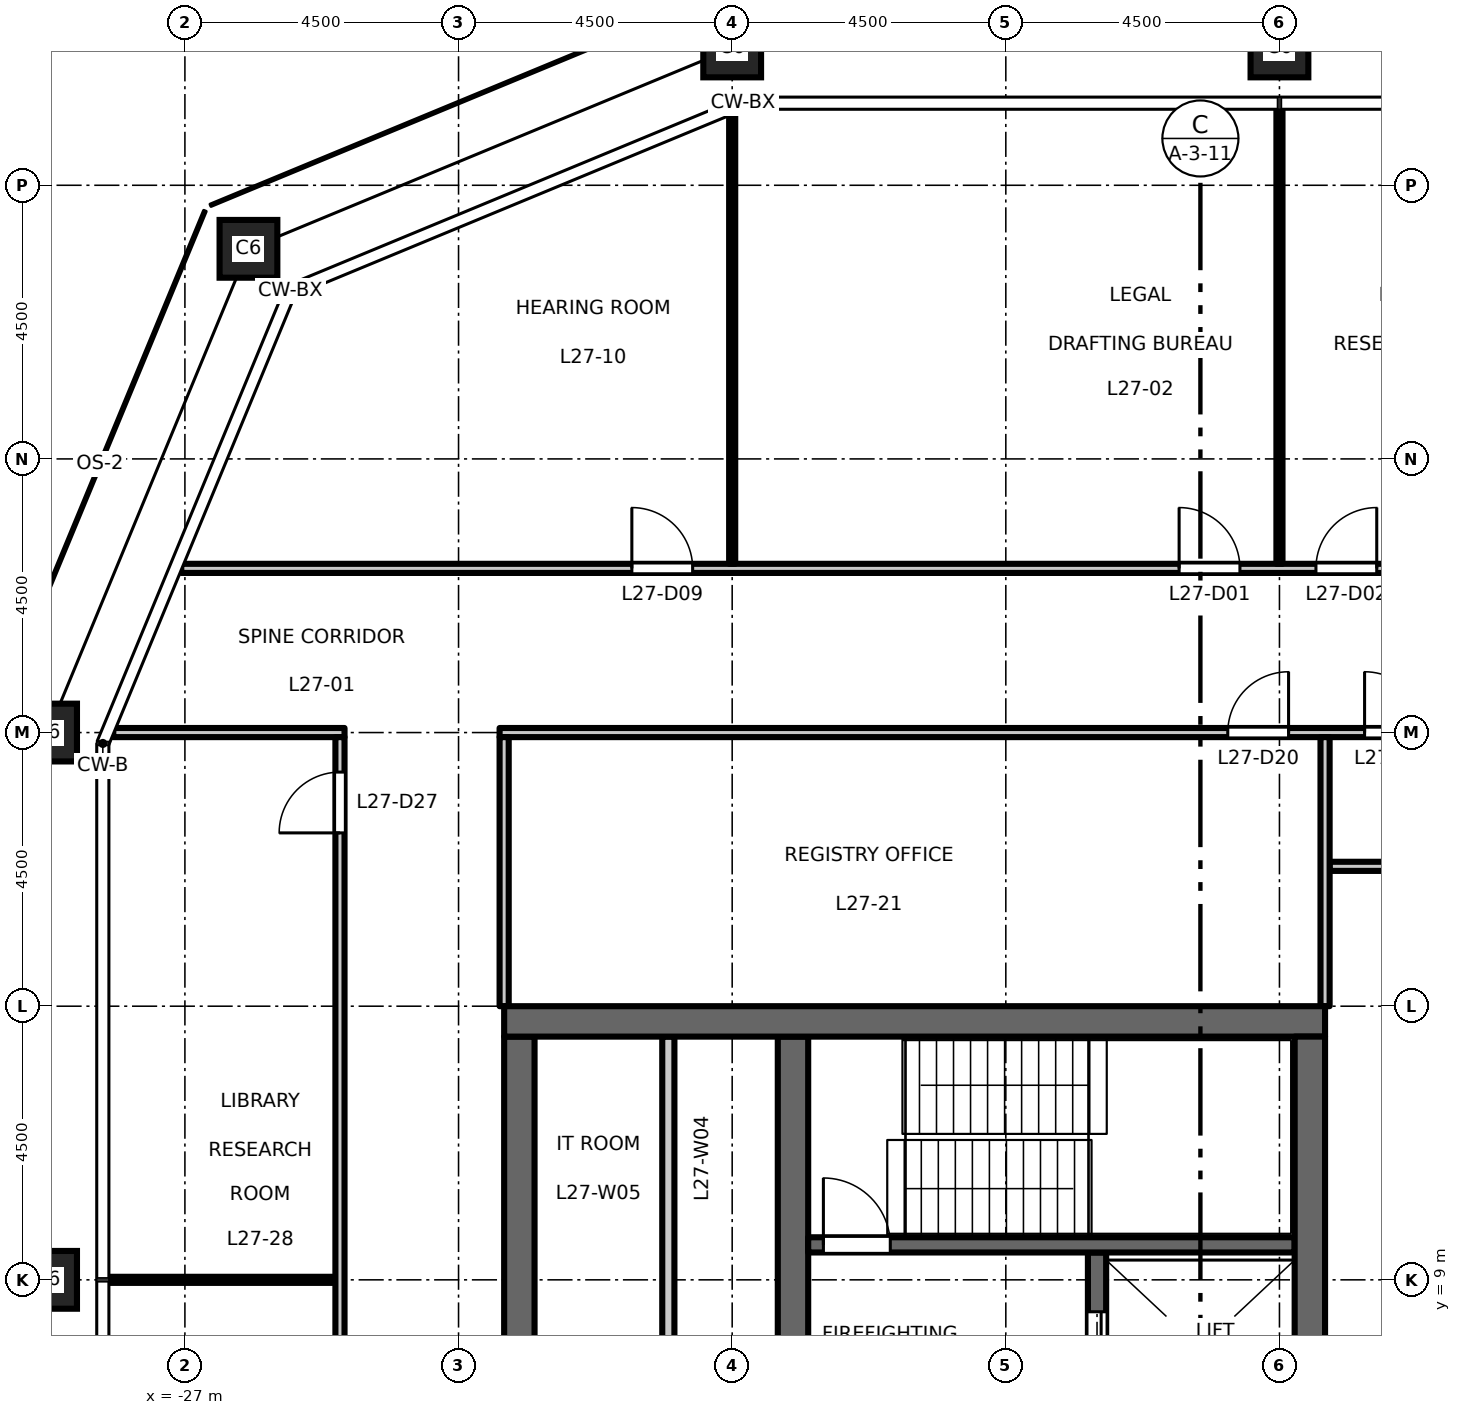
"""IFC4 building model, lengths in metres.
Left out: names, types, materials, properties, quantities, classifications, styles, units other than length and angle.
Written with IfcOpenShell. Run it as: python <this file> out.ifc"""

import sys

from ifc_helpers import new_model, si_unit, direction, frame, frame_2d, origin, origin_2d, place, context, subcontext, project, spatial, rectangle, hollow_rectangle, extrude, element, fill, save


model = new_model("IFC4")
c1 = context("Model", 3, precision=1e-05, world=origin(), true_north=direction((0.0, 1.0)))
c2 = subcontext(c1, "Body", "Model", "MODEL_VIEW")
j1 = project(units=[si_unit("LENGTHUNIT", "METRE"), si_unit("PLANEANGLEUNIT", "RADIAN")], contexts=[c1])
p1 = place(None, origin())
s1 = spatial("IfcSite", under=j1, at=p1, CompositionType="ELEMENT")
p2 = place(p1, origin())
s2 = spatial("IfcBuilding", under=s1, at=p2, CompositionType="ELEMENT")
p3 = place(p2, frame((0.0, 0.0, 127.2)))
s3 = spatial("IfcBuildingStorey", under=s2, at=p3, CompositionType="ELEMENT", Elevation=127.2)
for number, where, z_axis, x_axis in (
    (1, (-9.0, 29.25, 0.0), (0.0, 0.0, 1.0), (1.0, 0.0, 0.0)),
    (2, (-18.0, 29.25, 0.0), (0.0, 0.0, 1.0), (1.0, 0.0, 0.0)),
    (3, (-25.955, 25.955, 0.0), (0.0, 0.0, 1.0), (1.0, 0.0, 0.0)),
    (4, (-29.25, 18.0, 0.0), (0.0, 0.0, 1.0), (1.0, 0.0, 0.0)),
    (5, (-29.25, 9.0, 0.0), (0.0, 0.0, 1.0), (1.0, 0.0, 0.0)),
):
    element("IfcColumn", number, at=place(p3, frame(where, z_axis=z_axis, x_axis=x_axis)), inside=s3, PredefinedType="COLUMN", context=c2, shape_type="SweptSolid", body=[
        extrude(hollow_rectangle(XDim=0.95, YDim=0.95, WallThickness=0.055, at=origin_2d()), origin(), (0.0, 0.0, 1.0), 4.5),
    ])
p4 = place(p3, frame((-12.0, -9.45, 0.0), z_axis=(0.0, 0.0, 1.0), x_axis=(0.0, 1.0, 0.0)))
e6 = element("IfcWall", 6, at=p4, inside=s3, PredefinedType="SHEAR", context=c2, shape_type="SweptSolid", body=[
    extrude(rectangle(XDim=18.9, YDim=0.3, at=frame_2d((9.45, 0.0))), origin(), (0.0, 0.0, 1.0), 4.35),
])
p5 = place(p4, frame((3.625, 0.0, 0.0)))
e7 = element("IfcOpeningElement", 7, at=p5, cuts=e6, PredefinedType="OPENING", context=c2, shape_type="SweptSolid", body=[
    extrude(rectangle(XDim=1.1, YDim=2.1, at=frame_2d((0.55, 1.05))), frame((0.0, 0.16, 0.0), z_axis=(0.0, -1.0, 0.0), x_axis=(1.0, 0.0, 0.0)), (0.0, 0.0, 1.0), 0.32),
])
p6 = place(p4, frame((6.775, 0.0, 0.0)))
e8 = element("IfcOpeningElement", 8, at=p6, cuts=e6, PredefinedType="OPENING", context=c2, shape_type="SweptSolid", body=[
    extrude(rectangle(XDim=1.1, YDim=2.1, at=frame_2d((0.55, 1.05))), frame((0.0, 0.16, 0.0), z_axis=(0.0, -1.0, 0.0), x_axis=(1.0, 0.0, 0.0)), (0.0, 0.0, 1.0), 0.32),
])
p7 = place(p4, frame((9.925, 0.0, 0.0)))
e9 = element("IfcOpeningElement", 9, at=p7, cuts=e6, PredefinedType="OPENING", context=c2, shape_type="SweptSolid", body=[
    extrude(rectangle(XDim=1.1, YDim=2.1, at=frame_2d((0.55, 1.05))), frame((0.0, 0.16, 0.0), z_axis=(0.0, -1.0, 0.0), x_axis=(1.0, 0.0, 0.0)), (0.0, 0.0, 1.0), 0.32),
])
p8 = place(p4, frame((13.075, 0.0, 0.0)))
e10 = element("IfcOpeningElement", 10, at=p8, cuts=e6, PredefinedType="OPENING", context=c2, shape_type="SweptSolid", body=[
    extrude(rectangle(XDim=1.1, YDim=2.1, at=frame_2d((0.55, 1.05))), frame((0.0, 0.16, 0.0), z_axis=(0.0, -1.0, 0.0), x_axis=(1.0, 0.0, 0.0)), (0.0, 0.0, 1.0), 0.32),
])
p9 = place(p4, frame((16.725, 0.0, 0.0)))
e11 = element("IfcOpeningElement", 11, at=p9, cuts=e6, PredefinedType="OPENING", context=c2, shape_type="SweptSolid", body=[
    extrude(rectangle(XDim=1.2, YDim=2.1, at=frame_2d((0.6, 1.05))), frame((0.0, 0.16, 0.0), z_axis=(0.0, -1.0, 0.0), x_axis=(1.0, 0.0, 0.0)), (0.0, 0.0, 1.0), 0.32),
])
p10 = place(p4, frame((0.975, 0.0, 0.0)))
e12 = element("IfcOpeningElement", 12, at=p10, cuts=e6, PredefinedType="OPENING", context=c2, shape_type="SweptSolid", body=[
    extrude(rectangle(XDim=1.2, YDim=2.1, at=frame_2d((0.6, 1.05))), frame((0.0, 0.16, 0.0), z_axis=(0.0, -1.0, 0.0), x_axis=(1.0, 0.0, 0.0)), (0.0, 0.0, 1.0), 0.32),
])
p11 = place(p3, frame((-21.5, -13.0, 0.0), z_axis=(0.0, 0.0, 1.0), x_axis=(0.0, 1.0, 0.0)))
e13 = element("IfcWall", 13, at=p11, inside=s3, PredefinedType="SHEAR", context=c2, shape_type="SweptSolid", body=[
    extrude(rectangle(XDim=26.0, YDim=0.5, at=frame_2d((13.0, 0.0))), origin(), (0.0, 0.0, 1.0), 4.35),
])
p12 = place(p11, frame((16.825, 0.0, 0.0)))
e14 = element("IfcOpeningElement", 14, at=p12, cuts=e13, PredefinedType="OPENING", context=c2, shape_type="SweptSolid", body=[
    extrude(rectangle(XDim=1.8, YDim=2.1, at=frame_2d((0.9, 1.05))), frame((0.0, 0.26, 0.0), z_axis=(0.0, -1.0, 0.0), x_axis=(1.0, 0.0, 0.0)), (0.0, 0.0, 1.0), 0.52),
])
p13 = place(p11, frame((7.375, 0.0, 0.0)))
e15 = element("IfcOpeningElement", 15, at=p13, cuts=e13, PredefinedType="OPENING", context=c2, shape_type="SweptSolid", body=[
    extrude(rectangle(XDim=1.8, YDim=2.1, at=frame_2d((0.9, 1.05))), frame((0.0, 0.26, 0.0), z_axis=(0.0, -1.0, 0.0), x_axis=(1.0, 0.0, 0.0)), (0.0, 0.0, 1.0), 0.52),
])
p14 = place(p3, frame((-19.05, 6.425, 0.0), z_axis=(0.0, 0.0, 1.0), x_axis=(0.0, 1.0, 0.0)))
e16 = element("IfcWall", 16, at=p14, inside=s3, PredefinedType="PARTITIONING", context=c2, shape_type="SweptSolid", body=[
    extrude(rectangle(XDim=6.575, YDim=0.2, at=frame_2d((3.288, 0.0))), origin(), (0.0, 0.0, 1.0), 4.35),
])
p15 = place(p3, frame((-17.0, 6.425, 0.0), z_axis=(0.0, 0.0, 1.0), x_axis=(0.0, 1.0, 0.0)))
e17 = element("IfcWall", 17, at=p15, inside=s3, PredefinedType="SHEAR", context=c2, shape_type="SweptSolid", body=[
    extrude(rectangle(XDim=6.575, YDim=0.5, at=frame_2d((3.288, 0.0))), origin(), (0.0, 0.0, 1.0), 4.35),
])
p16 = place(p3, frame((-8.75, 9.575, 0.0), z_axis=(0.0, 0.0, 1.0), x_axis=(-1.0, 0.0, 0.0)))
e18 = element("IfcWall", 18, at=p16, inside=s3, PredefinedType="SHEAR", context=c2, shape_type="SweptSolid", body=[
    extrude(rectangle(XDim=8.0, YDim=0.25, at=frame_2d((4.0, 0.0))), origin(), (0.0, 0.0, 1.0), 4.35),
])
p17 = place(p16, frame((6.65, 0.0, 0.0)))
e19 = element("IfcOpeningElement", 19, at=p17, cuts=e18, PredefinedType="OPENING", context=c2, shape_type="SweptSolid", body=[
    extrude(rectangle(XDim=1.1, YDim=2.1, at=frame_2d((0.55, 1.05))), frame((0.0, 0.135, 0.0), z_axis=(0.0, -1.0, 0.0), x_axis=(1.0, 0.0, 0.0)), (0.0, 0.0, 1.0), 0.27),
])
p18 = place(p3, frame((-8.25, 13.25, 0.0), z_axis=(0.0, 0.0, 1.0), x_axis=(-1.0, 0.0, 0.0)))
e20 = element("IfcWall", 20, at=p18, inside=s3, PredefinedType="SHEAR", context=c2, shape_type="SweptSolid", body=[
    extrude(rectangle(XDim=13.5, YDim=0.5, at=frame_2d((6.75, 0.0))), origin(), (0.0, 0.0, 1.0), 4.35),
])
p19 = place(p3, frame((-8.5, -13.0, 0.0), z_axis=(0.0, 0.0, 1.0), x_axis=(0.0, 1.0, 0.0)))
e21 = element("IfcWall", 21, at=p19, inside=s3, PredefinedType="SHEAR", context=c2, shape_type="SweptSolid", body=[
    extrude(rectangle(XDim=26.0, YDim=0.5, at=frame_2d((13.0, 0.0))), origin(), (0.0, 0.0, 1.0), 4.35),
])
p20 = place(p3, frame((-28.26, 9.0, 0.0), z_axis=(0.0, 0.0, 1.0), x_axis=(1.0, 0.0, 0.0)))
e22 = element("IfcWall", 22, at=p20, inside=s3, PredefinedType="PARTITIONING", context=c2, shape_type="SweptSolid", body=[
    extrude(rectangle(XDim=3.735, YDim=0.1, at=frame_2d((1.868, 0.0))), origin(), (0.0, 0.0, 1.0), 4.35),
])
p21 = place(p3, frame((-8.175, 15.8, 0.0), z_axis=(0.0, 0.0, 1.0), x_axis=(1.0, 0.0, 0.0)))
e23 = element("IfcWall", 23, at=p21, inside=s3, PredefinedType="PARTITIONING", context=c2, shape_type="SweptSolid", body=[
    extrude(rectangle(XDim=14.715, YDim=0.15, at=frame_2d((7.357, 0.0))), origin(), (0.0, 0.0, 1.0), 4.35),
])
p22 = place(p21, frame((4.325, 0.0, 0.0)))
e24 = element("IfcOpeningElement", 24, at=p22, cuts=e23, PredefinedType="OPENING", context=c2, shape_type="SweptSolid", body=[
    extrude(rectangle(XDim=1.0, YDim=2.1, at=frame_2d((0.5, 1.05))), frame((0.0, 0.085, 0.0), z_axis=(0.0, -1.0, 0.0), x_axis=(1.0, 0.0, 0.0)), (0.0, 0.0, 1.0), 0.17),
])
p23 = place(p21, frame((6.575, 0.0, 0.0)))
e25 = element("IfcOpeningElement", 25, at=p23, cuts=e23, PredefinedType="OPENING", context=c2, shape_type="SweptSolid", body=[
    extrude(rectangle(XDim=1.0, YDim=2.1, at=frame_2d((0.5, 1.05))), frame((0.0, 0.085, 0.0), z_axis=(0.0, -1.0, 0.0), x_axis=(1.0, 0.0, 0.0)), (0.0, 0.0, 1.0), 0.17),
])
p24 = place(p21, frame((13.075, 0.0, 0.0)))
e26 = element("IfcOpeningElement", 26, at=p24, cuts=e23, PredefinedType="OPENING", context=c2, shape_type="SweptSolid", body=[
    extrude(rectangle(XDim=1.0, YDim=2.1, at=frame_2d((0.5, 1.05))), frame((0.0, 0.085, 0.0), z_axis=(0.0, -1.0, 0.0), x_axis=(1.0, 0.0, 0.0)), (0.0, 0.0, 1.0), 0.17),
])
p25 = place(p3, frame((-28.178, 18.0, 0.0), z_axis=(0.0, 0.0, 1.0), x_axis=(1.0, 0.0, 0.0)))
e27 = element("IfcWall", 27, at=p25, inside=s3, PredefinedType="PARTITIONING", context=c2, shape_type="SweptSolid", body=[
    extrude(rectangle(XDim=3.803, YDim=0.15, at=frame_2d((1.901, 0.0))), origin(), (0.0, 0.0, 1.0), 4.35),
])
p26 = place(p3, frame((-21.825, 18.0, 0.0), z_axis=(0.0, 0.0, 1.0), x_axis=(1.0, 0.0, 0.0)))
e28 = element("IfcWall", 28, at=p26, inside=s3, PredefinedType="PARTITIONING", context=c2, shape_type="SweptSolid", body=[
    extrude(rectangle(XDim=43.65, YDim=0.15, at=frame_2d((21.825, 0.0))), origin(), (0.0, 0.0, 1.0), 4.35),
])
p27 = place(p26, frame((14.225, 0.0, 0.0)))
e29 = element("IfcOpeningElement", 29, at=p27, cuts=e28, PredefinedType="OPENING", context=c2, shape_type="SweptSolid", body=[
    extrude(rectangle(XDim=1.0, YDim=2.1, at=frame_2d((0.5, 1.05))), frame((0.0, 0.085, 0.0), z_axis=(0.0, -1.0, 0.0), x_axis=(1.0, 0.0, 0.0)), (0.0, 0.0, 1.0), 0.17),
])
p28 = place(p26, frame((11.975, 0.0, 0.0)))
e30 = element("IfcOpeningElement", 30, at=p28, cuts=e28, PredefinedType="OPENING", context=c2, shape_type="SweptSolid", body=[
    extrude(rectangle(XDim=1.0, YDim=2.1, at=frame_2d((0.5, 1.05))), frame((0.0, 0.085, 0.0), z_axis=(0.0, -1.0, 0.0), x_axis=(1.0, 0.0, 0.0)), (0.0, 0.0, 1.0), 0.17),
])
p29 = place(p26, frame((30.725, 0.0, 0.0)))
e31 = element("IfcOpeningElement", 31, at=p29, cuts=e28, PredefinedType="OPENING", context=c2, shape_type="SweptSolid", body=[
    extrude(rectangle(XDim=1.0, YDim=2.1, at=frame_2d((0.5, 1.05))), frame((0.0, 0.085, 0.0), z_axis=(0.0, -1.0, 0.0), x_axis=(1.0, 0.0, 0.0)), (0.0, 0.0, 1.0), 0.17),
])
p30 = place(p3, frame((-27.06, 20.7, 0.0), z_axis=(0.0, 0.0, 1.0), x_axis=(1.0, 0.0, 0.0)))
e32 = element("IfcWall", 32, at=p30, inside=s3, PredefinedType="PARTITIONING", context=c2, shape_type="SweptSolid", body=[
    extrude(rectangle(XDim=54.12, YDim=0.15, at=frame_2d((27.06, 0.0))), origin(), (0.0, 0.0, 1.0), 4.35),
])
p31 = place(p30, frame((16.41, 0.0, 0.0)))
e33 = element("IfcOpeningElement", 33, at=p31, cuts=e32, PredefinedType="OPENING", context=c2, shape_type="SweptSolid", body=[
    extrude(rectangle(XDim=1.0, YDim=2.1, at=frame_2d((0.5, 1.05))), frame((0.0, 0.085, 0.0), z_axis=(0.0, -1.0, 0.0), x_axis=(1.0, 0.0, 0.0)), (0.0, 0.0, 1.0), 0.17),
])
p32 = place(p30, frame((18.66, 0.0, 0.0)))
e34 = element("IfcOpeningElement", 34, at=p32, cuts=e32, PredefinedType="OPENING", context=c2, shape_type="SweptSolid", body=[
    extrude(rectangle(XDim=1.0, YDim=2.1, at=frame_2d((0.5, 1.05))), frame((0.0, 0.085, 0.0), z_axis=(0.0, -1.0, 0.0), x_axis=(1.0, 0.0, 0.0)), (0.0, 0.0, 1.0), 0.17),
])
p33 = place(p30, frame((34.41, 0.0, 0.0)))
e35 = element("IfcOpeningElement", 35, at=p33, cuts=e32, PredefinedType="OPENING", context=c2, shape_type="SweptSolid", body=[
    extrude(rectangle(XDim=1.0, YDim=2.1, at=frame_2d((0.5, 1.05))), frame((0.0, 0.085, 0.0), z_axis=(0.0, -1.0, 0.0), x_axis=(1.0, 0.0, 0.0)), (0.0, 0.0, 1.0), 0.17),
])
p34 = place(p30, frame((36.66, 0.0, 0.0)))
e36 = element("IfcOpeningElement", 36, at=p34, cuts=e32, PredefinedType="OPENING", context=c2, shape_type="SweptSolid", body=[
    extrude(rectangle(XDim=1.0, YDim=2.1, at=frame_2d((0.5, 1.05))), frame((0.0, 0.085, 0.0), z_axis=(0.0, -1.0, 0.0), x_axis=(1.0, 0.0, 0.0)), (0.0, 0.0, 1.0), 0.17),
])
p35 = place(p30, frame((7.41, 0.0, 0.0)))
e37 = element("IfcOpeningElement", 37, at=p35, cuts=e32, PredefinedType="OPENING", context=c2, shape_type="SweptSolid", body=[
    extrude(rectangle(XDim=1.0, YDim=2.1, at=frame_2d((0.5, 1.05))), frame((0.0, 0.085, 0.0), z_axis=(0.0, -1.0, 0.0), x_axis=(1.0, 0.0, 0.0)), (0.0, 0.0, 1.0), 0.17),
])
p36 = place(p30, frame((45.72, 0.0, 0.0)))
e38 = element("IfcOpeningElement", 38, at=p36, cuts=e32, PredefinedType="OPENING", context=c2, shape_type="SweptSolid", body=[
    extrude(rectangle(XDim=1.0, YDim=2.1, at=frame_2d((0.5, 1.05))), frame((0.0, 0.085, 0.0), z_axis=(0.0, -1.0, 0.0), x_axis=(1.0, 0.0, 0.0)), (0.0, 0.0, 1.0), 0.17),
])
p37 = place(p3, frame((-24.45, -17.925, 0.0), z_axis=(0.0, 0.0, 1.0), x_axis=(0.0, 1.0, 0.0)))
e39 = element("IfcWall", 39, at=p37, inside=s3, PredefinedType="PARTITIONING", context=c2, shape_type="SweptSolid", body=[
    extrude(rectangle(XDim=35.85, YDim=0.15, at=frame_2d((17.925, 0.0))), origin(), (0.0, 0.0, 1.0), 4.35),
])
p38 = place(p37, frame((0.525, 0.0, 0.0)))
e40 = element("IfcOpeningElement", 40, at=p38, cuts=e39, PredefinedType="OPENING", context=c2, shape_type="SweptSolid", body=[
    extrude(rectangle(XDim=1.0, YDim=2.1, at=frame_2d((0.5, 1.05))), frame((0.0, 0.085, 0.0), z_axis=(0.0, -1.0, 0.0), x_axis=(1.0, 0.0, 0.0)), (0.0, 0.0, 1.0), 0.17),
])
p39 = place(p37, frame((16.275, 0.0, 0.0)))
e41 = element("IfcOpeningElement", 41, at=p39, cuts=e39, PredefinedType="OPENING", context=c2, shape_type="SweptSolid", body=[
    extrude(rectangle(XDim=1.0, YDim=2.1, at=frame_2d((0.5, 1.05))), frame((0.0, 0.085, 0.0), z_axis=(0.0, -1.0, 0.0), x_axis=(1.0, 0.0, 0.0)), (0.0, 0.0, 1.0), 0.17),
])
p40 = place(p37, frame((18.525, 0.0, 0.0)))
e42 = element("IfcOpeningElement", 42, at=p40, cuts=e39, PredefinedType="OPENING", context=c2, shape_type="SweptSolid", body=[
    extrude(rectangle(XDim=1.0, YDim=2.1, at=frame_2d((0.5, 1.05))), frame((0.0, 0.085, 0.0), z_axis=(0.0, -1.0, 0.0), x_axis=(1.0, 0.0, 0.0)), (0.0, 0.0, 1.0), 0.17),
])
p41 = place(p37, frame((34.275, 0.0, 0.0)))
e43 = element("IfcOpeningElement", 43, at=p41, cuts=e39, PredefinedType="OPENING", context=c2, shape_type="SweptSolid", body=[
    extrude(rectangle(XDim=1.0, YDim=2.1, at=frame_2d((0.5, 1.05))), frame((0.0, 0.085, 0.0), z_axis=(0.0, -1.0, 0.0), x_axis=(1.0, 0.0, 0.0)), (0.0, 0.0, 1.0), 0.17),
])
p42 = place(p3, frame((-21.75, 13.5, 0.0), z_axis=(0.0, 0.0, 1.0), x_axis=(0.0, 1.0, 0.0)))
e44 = element("IfcWall", 44, at=p42, inside=s3, PredefinedType="PARTITIONING", context=c2, shape_type="SweptSolid", body=[
    extrude(rectangle(XDim=4.425, YDim=0.15, at=frame_2d((2.212, 0.0))), origin(), (0.0, 0.0, 1.0), 4.35),
])
p43 = place(p3, frame((-18.0, 20.775, 0.0), z_axis=(0.0, 0.0, 1.0), x_axis=(0.0, 1.0, 0.0)))
e45 = element("IfcWall", 45, at=p43, inside=s3, PredefinedType="PARTITIONING", context=c2, shape_type="SweptSolid", body=[
    extrude(rectangle(XDim=7.403, YDim=0.1, at=frame_2d((3.702, 0.0))), origin(), (0.0, 0.0, 1.0), 3.45),
])
p44 = place(p3, frame((-9.0, 20.775, 0.0), z_axis=(0.0, 0.0, 1.0), x_axis=(0.0, 1.0, 0.0)))
e46 = element("IfcWall", 46, at=p44, inside=s3, PredefinedType="PARTITIONING", context=c2, shape_type="SweptSolid", body=[
    extrude(rectangle(XDim=7.485, YDim=0.1, at=frame_2d((3.743, 0.0))), origin(), (0.0, 0.0, 1.0), 3.45),
])
p45 = place(p3, frame((-8.25, 13.5, 0.0), z_axis=(0.0, 0.0, 1.0), x_axis=(0.0, 1.0, 0.0)))
e47 = element("IfcWall", 47, at=p45, inside=s3, PredefinedType="PARTITIONING", context=c2, shape_type="SweptSolid", body=[
    extrude(rectangle(XDim=4.425, YDim=0.15, at=frame_2d((2.212, 0.0))), origin(), (0.0, 0.0, 1.0), 4.35),
])
p46 = place(p17, origin())
e48 = element("IfcDoor", 48, at=p46, inside=s3, OperationType="SINGLE_SWING_RIGHT", PredefinedType="DOOR", context=c2, shape_type="SweptSolid", body=[
    extrude(rectangle(XDim=1.1, YDim=2.1, at=frame_2d((0.55, 1.05))), frame((0.0, 0.025, 0.0), z_axis=(0.0, -1.0, 0.0), x_axis=(1.0, 0.0, 0.0)), (0.0, 0.0, 1.0), 0.05),
])
fill(e19, e48)
p47 = place(p9, origin())
e49 = element("IfcDoor", 49, at=p47, inside=s3, OperationType="DOUBLE_DOOR_SLIDING", PredefinedType="DOOR", context=c2, shape_type="SweptSolid", body=[
    extrude(rectangle(XDim=1.2, YDim=2.1, at=frame_2d((0.6, 1.05))), frame((0.0, 0.025, 0.0), z_axis=(0.0, -1.0, 0.0), x_axis=(1.0, 0.0, 0.0)), (0.0, 0.0, 1.0), 0.05),
])
fill(e11, e49)
p48 = place(p31, origin())
e50 = element("IfcDoor", 50, at=p48, inside=s3, OperationType="SINGLE_SWING_LEFT", PredefinedType="DOOR", context=c2, shape_type="SweptSolid", body=[
    extrude(rectangle(XDim=1.0, YDim=2.1, at=frame_2d((0.5, 1.05))), frame((0.0, 0.025, 0.0), z_axis=(0.0, -1.0, 0.0), x_axis=(1.0, 0.0, 0.0)), (0.0, 0.0, 1.0), 0.05),
])
fill(e33, e50)
p49 = place(p32, origin())
e51 = element("IfcDoor", 51, at=p49, inside=s3, OperationType="SINGLE_SWING_RIGHT", PredefinedType="DOOR", context=c2, shape_type="SweptSolid", body=[
    extrude(rectangle(XDim=1.0, YDim=2.1, at=frame_2d((0.5, 1.05))), frame((0.0, 0.025, 0.0), z_axis=(0.0, -1.0, 0.0), x_axis=(1.0, 0.0, 0.0)), (0.0, 0.0, 1.0), 0.05),
])
fill(e34, e51)
p50 = place(p35, origin())
e52 = element("IfcDoor", 52, at=p50, inside=s3, OperationType="SINGLE_SWING_LEFT", PredefinedType="DOOR", context=c2, shape_type="SweptSolid", body=[
    extrude(rectangle(XDim=1.0, YDim=2.1, at=frame_2d((0.5, 1.05))), frame((0.0, 0.025, 0.0), z_axis=(0.0, -1.0, 0.0), x_axis=(1.0, 0.0, 0.0)), (0.0, 0.0, 1.0), 0.05),
])
fill(e37, e52)
p51 = place(p27, origin())
e53 = element("IfcDoor", 53, at=p51, inside=s3, OperationType="SINGLE_SWING_LEFT", PredefinedType="DOOR", context=c2, shape_type="SweptSolid", body=[
    extrude(rectangle(XDim=1.0, YDim=2.1, at=frame_2d((0.5, 1.05))), frame((0.0, 0.025, 0.0), z_axis=(0.0, -1.0, 0.0), x_axis=(1.0, 0.0, 0.0)), (0.0, 0.0, 1.0), 0.05),
])
fill(e29, e53)
p52 = place(p28, origin())
e54 = element("IfcDoor", 54, at=p52, inside=s3, OperationType="SINGLE_SWING_RIGHT", PredefinedType="DOOR", context=c2, shape_type="SweptSolid", body=[
    extrude(rectangle(XDim=1.0, YDim=2.1, at=frame_2d((0.5, 1.05))), frame((0.0, 0.025, 0.0), z_axis=(0.0, -1.0, 0.0), x_axis=(1.0, 0.0, 0.0)), (0.0, 0.0, 1.0), 0.05),
])
fill(e30, e54)
p53 = place(p41, origin())
e55 = element("IfcDoor", 55, at=p53, inside=s3, OperationType="SINGLE_SWING_LEFT", PredefinedType="DOOR", context=c2, shape_type="SweptSolid", body=[
    extrude(rectangle(XDim=1.0, YDim=2.1, at=frame_2d((0.5, 1.05))), frame((0.0, 0.025, 0.0), z_axis=(0.0, -1.0, 0.0), x_axis=(1.0, 0.0, 0.0)), (0.0, 0.0, 1.0), 0.05),
])
fill(e43, e55)
save(model, sys.argv[1])
